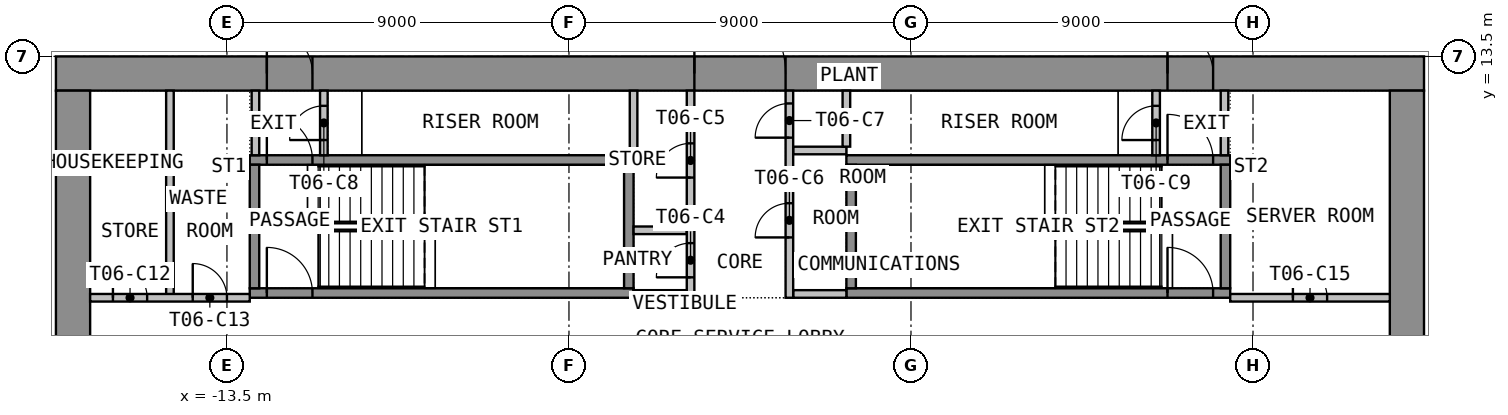
"""IFC4 building model, lengths in metres.
Left out: names, types, materials, properties, quantities, classifications, styles, units other than length and angle.
Written with IfcOpenShell. Run it as: python <this file> out.ifc"""

import sys

from ifc_helpers import new_model, si_unit, direction, frame, frame_2d, origin, place, context, subcontext, project, spatial, rectangle, extrude, element, fill, save


model = new_model("IFC4")
c1 = context("Model", 3, precision=1e-05, world=origin(), true_north=direction((0.0, 1.0)))
c2 = subcontext(c1, "Body", "Model", "MODEL_VIEW")
j1 = project(units=[si_unit("LENGTHUNIT", "METRE"), si_unit("PLANEANGLEUNIT", "RADIAN")], contexts=[c1])
p1 = place(None, origin())
s1 = spatial("IfcSite", under=j1, at=p1, CompositionType="ELEMENT")
p2 = place(p1, origin())
s2 = spatial("IfcBuilding", under=s1, at=p2, CompositionType="ELEMENT")
p3 = place(p2, frame((0.0, 0.0, 93.0)))
s3 = spatial("IfcBuildingStorey", under=s2, at=p3, CompositionType="ELEMENT", Elevation=93.0)
p4 = place(p3, frame((-18.0, 13.05, 0.0), z_axis=(0.0, 0.0, 1.0), x_axis=(1.0, 0.0, 0.0)))
e1 = element("IfcWall", 1, at=p4, inside=s3, PredefinedType="SHEAR", context=c2, shape_type="SweptSolid", body=[
    extrude(rectangle(XDim=36.0, YDim=0.9, at=frame_2d((18.0, 0.0))), origin(), (0.0, 0.0, 1.0), 3.525),
])
p5 = place(p4, frame((16.8, 0.0, 0.0)))
e2 = element("IfcOpeningElement", 2, at=p5, cuts=e1, PredefinedType="OPENING", context=c2, shape_type="SweptSolid", body=[
    extrude(rectangle(XDim=2.4, YDim=2.1, at=frame_2d((1.2, 1.05))), frame((0.0, 0.46, 0.0), z_axis=(0.0, -1.0, 0.0), x_axis=(1.0, 0.0, 0.0)), (0.0, 0.0, 1.0), 0.92),
])
p6 = place(p4, frame((5.55, 0.0, 0.0)))
e3 = element("IfcOpeningElement", 3, at=p6, cuts=e1, PredefinedType="OPENING", context=c2, shape_type="SweptSolid", body=[
    extrude(rectangle(XDim=1.2, YDim=2.1, at=frame_2d((0.6, 1.05))), frame((0.0, 0.46, 0.0), z_axis=(0.0, -1.0, 0.0), x_axis=(1.0, 0.0, 0.0)), (0.0, 0.0, 1.0), 0.92),
])
p7 = place(p4, frame((29.25, 0.0, 0.0)))
e4 = element("IfcOpeningElement", 4, at=p7, cuts=e1, PredefinedType="OPENING", context=c2, shape_type="SweptSolid", body=[
    extrude(rectangle(XDim=1.2, YDim=2.1, at=frame_2d((0.6, 1.05))), frame((0.0, 0.46, 0.0), z_axis=(0.0, -1.0, 0.0), x_axis=(1.0, 0.0, 0.0)), (0.0, 0.0, 1.0), 0.92),
])
p8 = place(p3, frame((-17.55, -12.6, 0.0), z_axis=(0.0, 0.0, 1.0), x_axis=(0.0, 1.0, 0.0)))
e5 = element("IfcWall", 5, at=p8, inside=s3, PredefinedType="SHEAR", context=c2, shape_type="SweptSolid", body=[
    extrude(rectangle(XDim=25.2, YDim=0.9, at=frame_2d((12.6, 0.0))), origin(), (0.0, 0.0, 1.0), 3.525),
])
p9 = place(p8, frame((11.4, 0.0, 0.0)))
e6 = element("IfcOpeningElement", 6, at=p9, cuts=e5, PredefinedType="OPENING", context=c2, shape_type="SweptSolid", body=[
    extrude(rectangle(XDim=2.4, YDim=2.1, at=frame_2d((1.2, 1.05))), frame((0.0, 0.46, 0.0), z_axis=(0.0, -1.0, 0.0), x_axis=(1.0, 0.0, 0.0)), (0.0, 0.0, 1.0), 0.92),
])
p10 = place(p3, frame((17.55, -12.6, 0.0), z_axis=(0.0, 0.0, 1.0), x_axis=(0.0, 1.0, 0.0)))
e7 = element("IfcWall", 7, at=p10, inside=s3, PredefinedType="SHEAR", context=c2, shape_type="SweptSolid", body=[
    extrude(rectangle(XDim=25.2, YDim=0.9, at=frame_2d((12.6, 0.0))), origin(), (0.0, 0.0, 1.0), 3.525),
])
p11 = place(p10, frame((11.4, 0.0, 0.0)))
e8 = element("IfcOpeningElement", 8, at=p11, cuts=e7, PredefinedType="OPENING", context=c2, shape_type="SweptSolid", body=[
    extrude(rectangle(XDim=2.4, YDim=2.1, at=frame_2d((1.2, 1.05))), frame((0.0, 0.46, 0.0), z_axis=(0.0, -1.0, 0.0), x_axis=(1.0, 0.0, 0.0)), (0.0, 0.0, 1.0), 0.92),
])
p12 = place(p3, frame((-12.9, 7.275, 0.0), z_axis=(0.0, 0.0, 1.0), x_axis=(1.0, 0.0, 0.0)))
e9 = element("IfcWall", 9, at=p12, inside=s3, PredefinedType="SHEAR", context=c2, shape_type="SweptSolid", body=[
    extrude(rectangle(XDim=10.1, YDim=0.25, at=frame_2d((5.05, 0.0))), origin(), (0.0, 0.0, 1.0), 3.525),
])
p13 = place(p12, frame((0.45, 0.0, 0.0)))
e10 = element("IfcOpeningElement", 10, at=p13, cuts=e9, PredefinedType="OPENING", context=c2, shape_type="SweptSolid", body=[
    extrude(rectangle(XDim=1.2, YDim=2.1, at=frame_2d((0.6, 1.05))), frame((0.0, 0.135, 0.0), z_axis=(0.0, -1.0, 0.0), x_axis=(1.0, 0.0, 0.0)), (0.0, 0.0, 1.0), 0.27),
])
p14 = place(p3, frame((-12.9, 10.775, 0.0), z_axis=(0.0, 0.0, 1.0), x_axis=(1.0, 0.0, 0.0)))
e11 = element("IfcWall", 11, at=p14, inside=s3, PredefinedType="SHEAR", context=c2, shape_type="SweptSolid", body=[
    extrude(rectangle(XDim=10.1, YDim=0.25, at=frame_2d((5.05, 0.0))), origin(), (0.0, 0.0, 1.0), 3.525),
])
p15 = place(p14, frame((0.45, 0.0, 0.0)))
e12 = element("IfcOpeningElement", 12, at=p15, cuts=e11, PredefinedType="OPENING", context=c2, shape_type="SweptSolid", body=[
    extrude(rectangle(XDim=1.2, YDim=2.1, at=frame_2d((0.6, 1.05))), frame((0.0, 0.135, 0.0), z_axis=(0.0, -1.0, 0.0), x_axis=(1.0, 0.0, 0.0)), (0.0, 0.0, 1.0), 0.27),
])
for number, where, z_axis, x_axis in (
    (13, (-12.775, 7.4, 0.0), (0.0, 0.0, 1.0), (0.0, 1.0, 0.0)),
    (14, (-2.925, 7.4, 0.0), (0.0, 0.0, 1.0), (0.0, 1.0, 0.0)),
):
    element("IfcWall", number, at=place(p3, frame(where, z_axis=z_axis, x_axis=x_axis)), inside=s3, PredefinedType="SHEAR", context=c2, shape_type="SweptSolid", body=[
        extrude(rectangle(XDim=3.25, YDim=0.25, at=frame_2d((1.625, 0.0))), origin(), (0.0, 0.0, 1.0), 3.525),
    ])
p16 = place(p3, frame((2.8, 7.275, 0.0), z_axis=(0.0, 0.0, 1.0), x_axis=(1.0, 0.0, 0.0)))
e15 = element("IfcWall", 15, at=p16, inside=s3, PredefinedType="SHEAR", context=c2, shape_type="SweptSolid", body=[
    extrude(rectangle(XDim=10.1, YDim=0.25, at=frame_2d((5.05, 0.0))), origin(), (0.0, 0.0, 1.0), 3.525),
])
p17 = place(p16, frame((8.45, 0.0, 0.0)))
e16 = element("IfcOpeningElement", 16, at=p17, cuts=e15, PredefinedType="OPENING", context=c2, shape_type="SweptSolid", body=[
    extrude(rectangle(XDim=1.2, YDim=2.1, at=frame_2d((0.6, 1.05))), frame((0.0, 0.135, 0.0), z_axis=(0.0, -1.0, 0.0), x_axis=(1.0, 0.0, 0.0)), (0.0, 0.0, 1.0), 0.27),
])
p18 = place(p3, frame((2.8, 10.775, 0.0), z_axis=(0.0, 0.0, 1.0), x_axis=(1.0, 0.0, 0.0)))
e17 = element("IfcWall", 17, at=p18, inside=s3, PredefinedType="SHEAR", context=c2, shape_type="SweptSolid", body=[
    extrude(rectangle(XDim=10.1, YDim=0.25, at=frame_2d((5.05, 0.0))), origin(), (0.0, 0.0, 1.0), 3.525),
])
p19 = place(p18, frame((8.45, 0.0, 0.0)))
e18 = element("IfcOpeningElement", 18, at=p19, cuts=e17, PredefinedType="OPENING", context=c2, shape_type="SweptSolid", body=[
    extrude(rectangle(XDim=1.2, YDim=2.1, at=frame_2d((0.6, 1.05))), frame((0.0, 0.135, 0.0), z_axis=(0.0, -1.0, 0.0), x_axis=(1.0, 0.0, 0.0)), (0.0, 0.0, 1.0), 0.27),
])
for number, where, z_axis, x_axis in (
    (19, (2.925, 7.4, 0.0), (0.0, 0.0, 1.0), (0.0, 1.0, 0.0)),
    (20, (12.775, 7.4, 0.0), (0.0, 0.0, 1.0), (0.0, 1.0, 0.0)),
):
    element("IfcWall", number, at=place(p3, frame(where, z_axis=z_axis, x_axis=x_axis)), inside=s3, PredefinedType="SHEAR", context=c2, shape_type="SweptSolid", body=[
        extrude(rectangle(XDim=3.25, YDim=0.25, at=frame_2d((1.625, 0.0))), origin(), (0.0, 0.0, 1.0), 3.525),
    ])
for number, where, z_axis, x_axis in (
    (21, (-2.8, 7.25, 0.0), (0.0, 0.0, 1.0), (1.0, 0.0, 0.0)),
    (22, (-2.8, 8.925, 0.0), (0.0, 0.0, 1.0), (1.0, 0.0, 0.0)),
    (23, (1.4, 7.25, 0.0), (0.0, 0.0, 1.0), (1.0, 0.0, 0.0)),
    (24, (1.4, 11.025, 0.0), (0.0, 0.0, 1.0), (1.0, 0.0, 0.0)),
):
    element("IfcWall", number, at=place(p3, frame(where, z_axis=z_axis, x_axis=x_axis)), inside=s3, PredefinedType="PARTITIONING", context=c2, shape_type="SweptSolid", body=[
        extrude(rectangle(XDim=1.4, YDim=0.2, at=frame_2d((0.7, 0.0))), origin(), (0.0, 0.0, 1.0), 3.525),
    ])
p20 = place(p3, frame((-1.3, 7.15, 0.0), z_axis=(0.0, 0.0, 1.0), x_axis=(0.0, 1.0, 0.0)))
e25 = element("IfcWall", 25, at=p20, inside=s3, PredefinedType="PARTITIONING", context=c2, shape_type="SweptSolid", body=[
    extrude(rectangle(XDim=5.45, YDim=0.2, at=frame_2d((2.725, 0.0))), origin(), (0.0, 0.0, 1.0), 3.525),
])
p21 = place(p20, frame((0.538, 0.0, 0.0)))
e26 = element("IfcOpeningElement", 26, at=p21, cuts=e25, PredefinedType="OPENING", context=c2, shape_type="SweptSolid", body=[
    extrude(rectangle(XDim=0.9, YDim=2.1, at=frame_2d((0.45, 1.05))), frame((0.0, 0.11, 0.0), z_axis=(0.0, -1.0, 0.0), x_axis=(1.0, 0.0, 0.0)), (0.0, 0.0, 1.0), 0.22),
])
p22 = place(p20, frame((3.163, 0.0, 0.0)))
e27 = element("IfcOpeningElement", 27, at=p22, cuts=e25, PredefinedType="OPENING", context=c2, shape_type="SweptSolid", body=[
    extrude(rectangle(XDim=0.9, YDim=2.1, at=frame_2d((0.45, 1.05))), frame((0.0, 0.11, 0.0), z_axis=(0.0, -1.0, 0.0), x_axis=(1.0, 0.0, 0.0)), (0.0, 0.0, 1.0), 0.22),
])
p23 = place(p3, frame((1.3, 7.15, 0.0), z_axis=(0.0, 0.0, 1.0), x_axis=(0.0, 1.0, 0.0)))
e28 = element("IfcWall", 28, at=p23, inside=s3, PredefinedType="PARTITIONING", context=c2, shape_type="SweptSolid", body=[
    extrude(rectangle(XDim=5.45, YDim=0.2, at=frame_2d((2.725, 0.0))), origin(), (0.0, 0.0, 1.0), 3.525),
])
p24 = place(p23, frame((1.587, 0.0, 0.0)))
e29 = element("IfcOpeningElement", 29, at=p24, cuts=e28, PredefinedType="OPENING", context=c2, shape_type="SweptSolid", body=[
    extrude(rectangle(XDim=0.9, YDim=2.1, at=frame_2d((0.45, 1.05))), frame((0.0, 0.11, 0.0), z_axis=(0.0, -1.0, 0.0), x_axis=(1.0, 0.0, 0.0)), (0.0, 0.0, 1.0), 0.22),
])
p25 = place(p23, frame((4.212, 0.0, 0.0)))
e30 = element("IfcOpeningElement", 30, at=p25, cuts=e28, PredefinedType="OPENING", context=c2, shape_type="SweptSolid", body=[
    extrude(rectangle(XDim=0.9, YDim=2.1, at=frame_2d((0.45, 1.05))), frame((0.0, 0.11, 0.0), z_axis=(0.0, -1.0, 0.0), x_axis=(1.0, 0.0, 0.0)), (0.0, 0.0, 1.0), 0.22),
])
p26 = place(p3, frame((-12.75, 10.9, 0.0), z_axis=(0.0, 0.0, 1.0), x_axis=(0.0, 1.0, 0.0)))
e31 = element("IfcWall", 31, at=p26, inside=s3, PredefinedType="PARTITIONING", context=c2, shape_type="SweptSolid", body=[
    extrude(rectangle(XDim=1.7, YDim=0.2, at=frame_2d((0.85, 0.0))), origin(), (0.0, 0.0, 1.0), 3.525),
])
p27 = place(p3, frame((-10.95, 10.9, 0.0), z_axis=(0.0, 0.0, 1.0), x_axis=(0.0, 1.0, 0.0)))
e32 = element("IfcWall", 32, at=p27, inside=s3, PredefinedType="PARTITIONING", context=c2, shape_type="SweptSolid", body=[
    extrude(rectangle(XDim=1.7, YDim=0.2, at=frame_2d((0.85, 0.0))), origin(), (0.0, 0.0, 1.0), 3.525),
])
p28 = place(p27, frame((0.4, 0.0, 0.0)))
e33 = element("IfcOpeningElement", 33, at=p28, cuts=e32, PredefinedType="OPENING", context=c2, shape_type="SweptSolid", body=[
    extrude(rectangle(XDim=0.9, YDim=2.1, at=frame_2d((0.45, 1.05))), frame((0.0, 0.11, 0.0), z_axis=(0.0, -1.0, 0.0), x_axis=(1.0, 0.0, 0.0)), (0.0, 0.0, 1.0), 0.22),
])
p29 = place(p3, frame((12.75, 10.9, 0.0), z_axis=(0.0, 0.0, 1.0), x_axis=(0.0, 1.0, 0.0)))
e34 = element("IfcWall", 34, at=p29, inside=s3, PredefinedType="PARTITIONING", context=c2, shape_type="SweptSolid", body=[
    extrude(rectangle(XDim=1.7, YDim=0.2, at=frame_2d((0.85, 0.0))), origin(), (0.0, 0.0, 1.0), 3.525),
])
p30 = place(p3, frame((10.95, 10.9, 0.0), z_axis=(0.0, 0.0, 1.0), x_axis=(0.0, 1.0, 0.0)))
e35 = element("IfcWall", 35, at=p30, inside=s3, PredefinedType="PARTITIONING", context=c2, shape_type="SweptSolid", body=[
    extrude(rectangle(XDim=1.7, YDim=0.2, at=frame_2d((0.85, 0.0))), origin(), (0.0, 0.0, 1.0), 3.525),
])
p31 = place(p30, frame((0.4, 0.0, 0.0)))
e36 = element("IfcOpeningElement", 36, at=p31, cuts=e35, PredefinedType="OPENING", context=c2, shape_type="SweptSolid", body=[
    extrude(rectangle(XDim=0.9, YDim=2.1, at=frame_2d((0.45, 1.05))), frame((0.0, 0.11, 0.0), z_axis=(0.0, -1.0, 0.0), x_axis=(1.0, 0.0, 0.0)), (0.0, 0.0, 1.0), 0.22),
])
p32 = place(p3, frame((-15.0, 7.15, 0.0), z_axis=(0.0, 0.0, 1.0), x_axis=(0.0, 1.0, 0.0)))
e37 = element("IfcWall", 37, at=p32, inside=s3, PredefinedType="PARTITIONING", context=c2, shape_type="SweptSolid", body=[
    extrude(rectangle(XDim=5.45, YDim=0.2, at=frame_2d((2.725, 0.0))), origin(), (0.0, 0.0, 1.0), 3.525),
])
p33 = place(p3, frame((-17.1, 7.15, 0.0), z_axis=(0.0, 0.0, 1.0), x_axis=(1.0, 0.0, 0.0)))
e38 = element("IfcWall", 38, at=p33, inside=s3, PredefinedType="PARTITIONING", context=c2, shape_type="SweptSolid", body=[
    extrude(rectangle(XDim=4.2, YDim=0.2, at=frame_2d((2.1, 0.0))), origin(), (0.0, 0.0, 1.0), 3.525),
])
p34 = place(p33, frame((0.6, 0.0, 0.0)))
e39 = element("IfcOpeningElement", 39, at=p34, cuts=e38, PredefinedType="OPENING", context=c2, shape_type="SweptSolid", body=[
    extrude(rectangle(XDim=0.9, YDim=2.1, at=frame_2d((0.45, 1.05))), frame((0.0, 0.11, 0.0), z_axis=(0.0, -1.0, 0.0), x_axis=(1.0, 0.0, 0.0)), (0.0, 0.0, 1.0), 0.22),
])
p35 = place(p33, frame((2.7, 0.0, 0.0)))
e40 = element("IfcOpeningElement", 40, at=p35, cuts=e38, PredefinedType="OPENING", context=c2, shape_type="SweptSolid", body=[
    extrude(rectangle(XDim=0.9, YDim=2.1, at=frame_2d((0.45, 1.05))), frame((0.0, 0.11, 0.0), z_axis=(0.0, -1.0, 0.0), x_axis=(1.0, 0.0, 0.0)), (0.0, 0.0, 1.0), 0.22),
])
p36 = place(p3, frame((12.9, 7.15, 0.0), z_axis=(0.0, 0.0, 1.0), x_axis=(1.0, 0.0, 0.0)))
e41 = element("IfcWall", 41, at=p36, inside=s3, PredefinedType="PARTITIONING", context=c2, shape_type="SweptSolid", body=[
    extrude(rectangle(XDim=4.2, YDim=0.2, at=frame_2d((2.1, 0.0))), origin(), (0.0, 0.0, 1.0), 3.525),
])
p37 = place(p36, frame((1.65, 0.0, 0.0)))
e42 = element("IfcOpeningElement", 42, at=p37, cuts=e41, PredefinedType="OPENING", context=c2, shape_type="SweptSolid", body=[
    extrude(rectangle(XDim=0.9, YDim=2.1, at=frame_2d((0.45, 1.05))), frame((0.0, 0.11, 0.0), z_axis=(0.0, -1.0, 0.0), x_axis=(1.0, 0.0, 0.0)), (0.0, 0.0, 1.0), 0.22),
])
p38 = place(p3, frame((-2.8, 10.901, 0.0), z_axis=(0.0, 0.0, 1.0), x_axis=(0.0, 1.0, 0.0)))
e43 = element("IfcWall", 43, at=p38, inside=s3, PredefinedType="PARTITIONING", context=c2, shape_type="SweptSolid", body=[
    extrude(rectangle(XDim=1.698, YDim=0.2, at=frame_2d((0.849, 0.0))), origin(), (0.0, 0.0, 1.0), 3.525),
])
p39 = place(p3, frame((2.8, 12.599, 0.0), z_axis=(0.0, 0.0, 1.0), x_axis=(0.0, -1.0, 0.0)))
e44 = element("IfcWall", 44, at=p39, inside=s3, PredefinedType="PARTITIONING", context=c2, shape_type="SweptSolid", body=[
    extrude(rectangle(XDim=1.473, YDim=0.2, at=frame_2d((0.737, 0.0))), origin(), (0.0, 0.0, 1.0), 3.525),
])
p40 = place(p5, origin())
e45 = element("IfcDoor", 45, at=p40, inside=s3, OperationType="DOUBLE_DOOR_DOUBLE_SWING", PredefinedType="DOOR", context=c2, shape_type="SweptSolid", body=[
    extrude(rectangle(XDim=2.4, YDim=2.1, at=frame_2d((1.2, 1.05))), frame((0.0, 0.025, 0.0), z_axis=(0.0, -1.0, 0.0), x_axis=(1.0, 0.0, 0.0)), (0.0, 0.0, 1.0), 0.05),
])
fill(e2, e45)
p41 = place(p6, origin())
e46 = element("IfcDoor", 46, at=p41, inside=s3, OperationType="SINGLE_SWING_RIGHT", PredefinedType="DOOR", context=c2, shape_type="SweptSolid", body=[
    extrude(rectangle(XDim=1.2, YDim=2.1, at=frame_2d((0.6, 1.05))), frame((0.0, 0.025, 0.0), z_axis=(0.0, -1.0, 0.0), x_axis=(1.0, 0.0, 0.0)), (0.0, 0.0, 1.0), 0.05),
])
fill(e3, e46)
p42 = place(p7, origin())
e47 = element("IfcDoor", 47, at=p42, inside=s3, OperationType="SINGLE_SWING_RIGHT", PredefinedType="DOOR", context=c2, shape_type="SweptSolid", body=[
    extrude(rectangle(XDim=1.2, YDim=2.1, at=frame_2d((0.6, 1.05))), frame((0.0, 0.025, 0.0), z_axis=(0.0, -1.0, 0.0), x_axis=(1.0, 0.0, 0.0)), (0.0, 0.0, 1.0), 0.05),
])
fill(e4, e47)
p43 = place(p13, origin())
e48 = element("IfcDoor", 48, at=p43, inside=s3, OperationType="SINGLE_SWING_LEFT", PredefinedType="DOOR", context=c2, shape_type="SweptSolid", body=[
    extrude(rectangle(XDim=1.2, YDim=2.1, at=frame_2d((0.6, 1.05))), frame((0.0, 0.025, 0.0), z_axis=(0.0, -1.0, 0.0), x_axis=(1.0, 0.0, 0.0)), (0.0, 0.0, 1.0), 0.05),
])
fill(e10, e48)
p44 = place(p17, origin())
e49 = element("IfcDoor", 49, at=p44, inside=s3, OperationType="SINGLE_SWING_LEFT", PredefinedType="DOOR", context=c2, shape_type="SweptSolid", body=[
    extrude(rectangle(XDim=1.2, YDim=2.1, at=frame_2d((0.6, 1.05))), frame((0.0, 0.025, 0.0), z_axis=(0.0, -1.0, 0.0), x_axis=(1.0, 0.0, 0.0)), (0.0, 0.0, 1.0), 0.05),
])
fill(e16, e49)
p45 = place(p21, origin())
e50 = element("IfcDoor", 50, at=p45, inside=s3, OperationType="SINGLE_SWING_LEFT", PredefinedType="DOOR", context=c2, shape_type="SweptSolid", body=[
    extrude(rectangle(XDim=0.9, YDim=2.1, at=frame_2d((0.45, 1.05))), frame((0.0, 0.025, 0.0), z_axis=(0.0, -1.0, 0.0), x_axis=(1.0, 0.0, 0.0)), (0.0, 0.0, 1.0), 0.05),
])
fill(e26, e50)
p46 = place(p22, origin())
e51 = element("IfcDoor", 51, at=p46, inside=s3, OperationType="SINGLE_SWING_LEFT", PredefinedType="DOOR", context=c2, shape_type="SweptSolid", body=[
    extrude(rectangle(XDim=0.9, YDim=2.1, at=frame_2d((0.45, 1.05))), frame((0.0, 0.025, 0.0), z_axis=(0.0, -1.0, 0.0), x_axis=(1.0, 0.0, 0.0)), (0.0, 0.0, 1.0), 0.05),
])
fill(e27, e51)
p47 = place(p24, origin())
e52 = element("IfcDoor", 52, at=p47, inside=s3, OperationType="SINGLE_SWING_LEFT", PredefinedType="DOOR", context=c2, shape_type="SweptSolid", body=[
    extrude(rectangle(XDim=0.9, YDim=2.1, at=frame_2d((0.45, 1.05))), frame((0.0, 0.025, 0.0), z_axis=(0.0, -1.0, 0.0), x_axis=(1.0, 0.0, 0.0)), (0.0, 0.0, 1.0), 0.05),
])
fill(e29, e52)
p48 = place(p25, origin())
e53 = element("IfcDoor", 53, at=p48, inside=s3, OperationType="SINGLE_SWING_LEFT", PredefinedType="DOOR", context=c2, shape_type="SweptSolid", body=[
    extrude(rectangle(XDim=0.9, YDim=2.1, at=frame_2d((0.45, 1.05))), frame((0.0, 0.025, 0.0), z_axis=(0.0, -1.0, 0.0), x_axis=(1.0, 0.0, 0.0)), (0.0, 0.0, 1.0), 0.05),
])
fill(e30, e53)
p49 = place(p15, origin())
e54 = element("IfcDoor", 54, at=p49, inside=s3, OperationType="SINGLE_SWING_RIGHT", PredefinedType="DOOR", context=c2, shape_type="SweptSolid", body=[
    extrude(rectangle(XDim=1.2, YDim=2.1, at=frame_2d((0.6, 1.05))), frame((0.0, 0.025, 0.0), z_axis=(0.0, -1.0, 0.0), x_axis=(1.0, 0.0, 0.0)), (0.0, 0.0, 1.0), 0.05),
])
fill(e12, e54)
p50 = place(p28, origin())
e55 = element("IfcDoor", 55, at=p50, inside=s3, OperationType="SINGLE_SWING_LEFT", PredefinedType="DOOR", context=c2, shape_type="SweptSolid", body=[
    extrude(rectangle(XDim=0.9, YDim=2.1, at=frame_2d((0.45, 1.05))), frame((0.0, 0.025, 0.0), z_axis=(0.0, -1.0, 0.0), x_axis=(1.0, 0.0, 0.0)), (0.0, 0.0, 1.0), 0.05),
])
fill(e33, e55)
p51 = place(p19, origin())
e56 = element("IfcDoor", 56, at=p51, inside=s3, OperationType="SINGLE_SWING_RIGHT", PredefinedType="DOOR", context=c2, shape_type="SweptSolid", body=[
    extrude(rectangle(XDim=1.2, YDim=2.1, at=frame_2d((0.6, 1.05))), frame((0.0, 0.025, 0.0), z_axis=(0.0, -1.0, 0.0), x_axis=(1.0, 0.0, 0.0)), (0.0, 0.0, 1.0), 0.05),
])
fill(e18, e56)
p52 = place(p31, origin())
e57 = element("IfcDoor", 57, at=p52, inside=s3, OperationType="SINGLE_SWING_LEFT", PredefinedType="DOOR", context=c2, shape_type="SweptSolid", body=[
    extrude(rectangle(XDim=0.9, YDim=2.1, at=frame_2d((0.45, 1.05))), frame((0.0, 0.025, 0.0), z_axis=(0.0, -1.0, 0.0), x_axis=(1.0, 0.0, 0.0)), (0.0, 0.0, 1.0), 0.05),
])
fill(e36, e57)
p53 = place(p34, origin())
e58 = element("IfcDoor", 58, at=p53, inside=s3, OperationType="SINGLE_SWING_LEFT", PredefinedType="DOOR", context=c2, shape_type="SweptSolid", body=[
    extrude(rectangle(XDim=0.9, YDim=2.1, at=frame_2d((0.45, 1.05))), frame((0.0, 0.025, 0.0), z_axis=(0.0, -1.0, 0.0), x_axis=(1.0, 0.0, 0.0)), (0.0, 0.0, 1.0), 0.05),
])
fill(e39, e58)
p54 = place(p35, origin())
e59 = element("IfcDoor", 59, at=p54, inside=s3, OperationType="SINGLE_SWING_LEFT", PredefinedType="DOOR", context=c2, shape_type="SweptSolid", body=[
    extrude(rectangle(XDim=0.9, YDim=2.1, at=frame_2d((0.45, 1.05))), frame((0.0, 0.025, 0.0), z_axis=(0.0, -1.0, 0.0), x_axis=(1.0, 0.0, 0.0)), (0.0, 0.0, 1.0), 0.05),
])
fill(e40, e59)
p55 = place(p37, origin())
e60 = element("IfcDoor", 60, at=p55, inside=s3, OperationType="SINGLE_SWING_LEFT", PredefinedType="DOOR", context=c2, shape_type="SweptSolid", body=[
    extrude(rectangle(XDim=0.9, YDim=2.1, at=frame_2d((0.45, 1.05))), frame((0.0, 0.025, 0.0), z_axis=(0.0, -1.0, 0.0), x_axis=(1.0, 0.0, 0.0)), (0.0, 0.0, 1.0), 0.05),
])
fill(e42, e60)
save(model, sys.argv[1])
